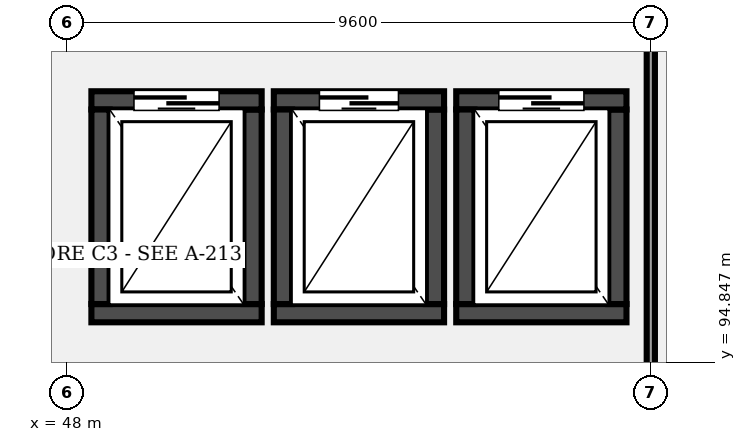
"""IFC4 building model, lengths in metres.
Left out: names, types, materials, properties, quantities, classifications, styles, units other than length and angle.
Written with IfcOpenShell. Run it as: python <this file> out.ifc"""

import sys

from ifc_helpers import new_model, si_unit, direction, frame, frame_2d, origin, place, context, subcontext, project, spatial, rectangle, extrude, element, fill, save


model = new_model("IFC4")
c1 = context("Model", 3, precision=1e-05, world=origin(), true_north=direction((0.0, 1.0)))
c2 = subcontext(c1, "Body", "Model", "MODEL_VIEW")
j1 = project(units=[si_unit("LENGTHUNIT", "METRE"), si_unit("PLANEANGLEUNIT", "RADIAN")], contexts=[c1])
p1 = place(None, origin())
s1 = spatial("IfcSite", under=j1, at=p1, CompositionType="ELEMENT")
p2 = place(p1, origin())
s2 = spatial("IfcBuilding", under=s1, at=p2, CompositionType="ELEMENT")
p3 = place(p2, frame((0.0, 0.0, 13.5)))
s3 = spatial("IfcBuildingStorey", under=s2, at=p3, CompositionType="ELEMENT", Elevation=13.5)
p4 = place(p3, frame((48.4, 95.65, 0.0), z_axis=(0.0, 0.0, 1.0), x_axis=(1.0, 0.0, 0.0)))
e1 = element("IfcWall", 1, at=p4, inside=s3, PredefinedType="SHEAR", context=c2, shape_type="SweptSolid", body=[
    extrude(rectangle(XDim=2.8, YDim=0.3, at=frame_2d((1.4, 0.0))), origin(), (0.0, 0.0, 1.0), 4.3),
])
p5 = place(p3, frame((51.05, 95.8, 0.0), z_axis=(0.0, 0.0, 1.0), x_axis=(0.0, 1.0, 0.0)))
e2 = element("IfcWall", 2, at=p5, inside=s3, PredefinedType="SHEAR", context=c2, shape_type="SweptSolid", body=[
    extrude(rectangle(XDim=3.2, YDim=0.3, at=frame_2d((1.6, 0.0))), origin(), (0.0, 0.0, 1.0), 4.3),
])
p6 = place(p3, frame((51.2, 99.15, 0.0), z_axis=(0.0, 0.0, 1.0), x_axis=(-1.0, 0.0, 0.0)))
e3 = element("IfcWall", 3, at=p6, inside=s3, PredefinedType="SHEAR", context=c2, shape_type="SweptSolid", body=[
    extrude(rectangle(XDim=2.8, YDim=0.3, at=frame_2d((1.4, 0.0))), origin(), (0.0, 0.0, 1.0), 4.3),
])
p7 = place(p6, frame((0.7, 0.0, 0.0)))
e4 = element("IfcOpeningElement", 4, at=p7, cuts=e3, PredefinedType="OPENING", context=c2, shape_type="SweptSolid", body=[
    extrude(rectangle(XDim=1.4, YDim=2.3, at=frame_2d((0.7, 1.15))), frame((0.0, 0.16, 0.0), z_axis=(0.0, -1.0, 0.0), x_axis=(1.0, 0.0, 0.0)), (0.0, 0.0, 1.0), 0.32),
])
p8 = place(p3, frame((48.55, 99.0, 0.0), z_axis=(0.0, 0.0, 1.0), x_axis=(0.0, -1.0, 0.0)))
e5 = element("IfcWall", 5, at=p8, inside=s3, PredefinedType="SHEAR", context=c2, shape_type="SweptSolid", body=[
    extrude(rectangle(XDim=3.2, YDim=0.3, at=frame_2d((1.6, 0.0))), origin(), (0.0, 0.0, 1.0), 4.3),
])
p9 = place(p3, frame((51.4, 95.65, 0.0), z_axis=(0.0, 0.0, 1.0), x_axis=(1.0, 0.0, 0.0)))
e6 = element("IfcWall", 6, at=p9, inside=s3, PredefinedType="SHEAR", context=c2, shape_type="SweptSolid", body=[
    extrude(rectangle(XDim=2.8, YDim=0.3, at=frame_2d((1.4, 0.0))), origin(), (0.0, 0.0, 1.0), 4.3),
])
p10 = place(p3, frame((54.05, 95.8, 0.0), z_axis=(0.0, 0.0, 1.0), x_axis=(0.0, 1.0, 0.0)))
e7 = element("IfcWall", 7, at=p10, inside=s3, PredefinedType="SHEAR", context=c2, shape_type="SweptSolid", body=[
    extrude(rectangle(XDim=3.2, YDim=0.3, at=frame_2d((1.6, 0.0))), origin(), (0.0, 0.0, 1.0), 4.3),
])
p11 = place(p3, frame((54.2, 99.15, 0.0), z_axis=(0.0, 0.0, 1.0), x_axis=(-1.0, 0.0, 0.0)))
e8 = element("IfcWall", 8, at=p11, inside=s3, PredefinedType="SHEAR", context=c2, shape_type="SweptSolid", body=[
    extrude(rectangle(XDim=2.8, YDim=0.3, at=frame_2d((1.4, 0.0))), origin(), (0.0, 0.0, 1.0), 4.3),
])
p12 = place(p11, frame((0.75, 0.0, 0.0)))
e9 = element("IfcOpeningElement", 9, at=p12, cuts=e8, PredefinedType="OPENING", context=c2, shape_type="SweptSolid", body=[
    extrude(rectangle(XDim=1.3, YDim=2.3, at=frame_2d((0.65, 1.15))), frame((0.0, 0.16, 0.0), z_axis=(0.0, -1.0, 0.0), x_axis=(1.0, 0.0, 0.0)), (0.0, 0.0, 1.0), 0.32),
])
p13 = place(p3, frame((51.55, 99.0, 0.0), z_axis=(0.0, 0.0, 1.0), x_axis=(0.0, -1.0, 0.0)))
e10 = element("IfcWall", 10, at=p13, inside=s3, PredefinedType="SHEAR", context=c2, shape_type="SweptSolid", body=[
    extrude(rectangle(XDim=3.2, YDim=0.3, at=frame_2d((1.6, 0.0))), origin(), (0.0, 0.0, 1.0), 4.3),
])
p14 = place(p3, frame((54.4, 95.65, 0.0), z_axis=(0.0, 0.0, 1.0), x_axis=(1.0, 0.0, 0.0)))
e11 = element("IfcWall", 11, at=p14, inside=s3, PredefinedType="SHEAR", context=c2, shape_type="SweptSolid", body=[
    extrude(rectangle(XDim=2.8, YDim=0.3, at=frame_2d((1.4, 0.0))), origin(), (0.0, 0.0, 1.0), 4.3),
])
p15 = place(p3, frame((57.05, 95.8, 0.0), z_axis=(0.0, 0.0, 1.0), x_axis=(0.0, 1.0, 0.0)))
e12 = element("IfcWall", 12, at=p15, inside=s3, PredefinedType="SHEAR", context=c2, shape_type="SweptSolid", body=[
    extrude(rectangle(XDim=3.2, YDim=0.3, at=frame_2d((1.6, 0.0))), origin(), (0.0, 0.0, 1.0), 4.3),
])
p16 = place(p3, frame((57.2, 99.15, 0.0), z_axis=(0.0, 0.0, 1.0), x_axis=(-1.0, 0.0, 0.0)))
e13 = element("IfcWall", 13, at=p16, inside=s3, PredefinedType="SHEAR", context=c2, shape_type="SweptSolid", body=[
    extrude(rectangle(XDim=2.8, YDim=0.3, at=frame_2d((1.4, 0.0))), origin(), (0.0, 0.0, 1.0), 4.3),
])
p17 = place(p16, frame((0.7, 0.0, 0.0)))
e14 = element("IfcOpeningElement", 14, at=p17, cuts=e13, PredefinedType="OPENING", context=c2, shape_type="SweptSolid", body=[
    extrude(rectangle(XDim=1.4, YDim=2.3, at=frame_2d((0.7, 1.15))), frame((0.0, 0.16, 0.0), z_axis=(0.0, -1.0, 0.0), x_axis=(1.0, 0.0, 0.0)), (0.0, 0.0, 1.0), 0.32),
])
p18 = place(p3, frame((54.55, 99.0, 0.0), z_axis=(0.0, 0.0, 1.0), x_axis=(0.0, -1.0, 0.0)))
e15 = element("IfcWall", 15, at=p18, inside=s3, PredefinedType="SHEAR", context=c2, shape_type="SweptSolid", body=[
    extrude(rectangle(XDim=3.2, YDim=0.3, at=frame_2d((1.6, 0.0))), origin(), (0.0, 0.0, 1.0), 4.3),
])
p19 = place(p3, frame((57.6, 92.6, 0.0), z_axis=(0.0, 0.0, 1.0), x_axis=(0.0, 1.0, 0.0)))
e16 = element("IfcWall", 16, at=p19, inside=s3, PredefinedType="PARTITIONING", context=c2, shape_type="SweptSolid", body=[
    extrude(rectangle(XDim=9.25, YDim=0.135, at=frame_2d((4.625, 0.0))), origin(), (0.0, 0.0, 1.0), 3.4),
])
p20 = place(p7, origin())
e17 = element("IfcDoor", 17, at=p20, inside=s3, OperationType="SLIDING_TO_LEFT", PredefinedType="DOOR", context=c2, shape_type="SweptSolid", body=[
    extrude(rectangle(XDim=1.4, YDim=2.3, at=frame_2d((0.7, 1.15))), frame((0.0, 0.025, 0.0), z_axis=(0.0, -1.0, 0.0), x_axis=(1.0, 0.0, 0.0)), (0.0, 0.0, 1.0), 0.05),
])
fill(e4, e17)
p21 = place(p12, origin())
e18 = element("IfcDoor", 18, at=p21, inside=s3, OperationType="SLIDING_TO_LEFT", PredefinedType="DOOR", context=c2, shape_type="SweptSolid", body=[
    extrude(rectangle(XDim=1.3, YDim=2.3, at=frame_2d((0.65, 1.15))), frame((0.0, 0.025, 0.0), z_axis=(0.0, -1.0, 0.0), x_axis=(1.0, 0.0, 0.0)), (0.0, 0.0, 1.0), 0.05),
])
fill(e9, e18)
p22 = place(p17, origin())
e19 = element("IfcDoor", 19, at=p22, inside=s3, OperationType="SLIDING_TO_LEFT", PredefinedType="DOOR", context=c2, shape_type="SweptSolid", body=[
    extrude(rectangle(XDim=1.4, YDim=2.3, at=frame_2d((0.7, 1.15))), frame((0.0, 0.025, 0.0), z_axis=(0.0, -1.0, 0.0), x_axis=(1.0, 0.0, 0.0)), (0.0, 0.0, 1.0), 0.05),
])
fill(e14, e19)
save(model, sys.argv[1])
